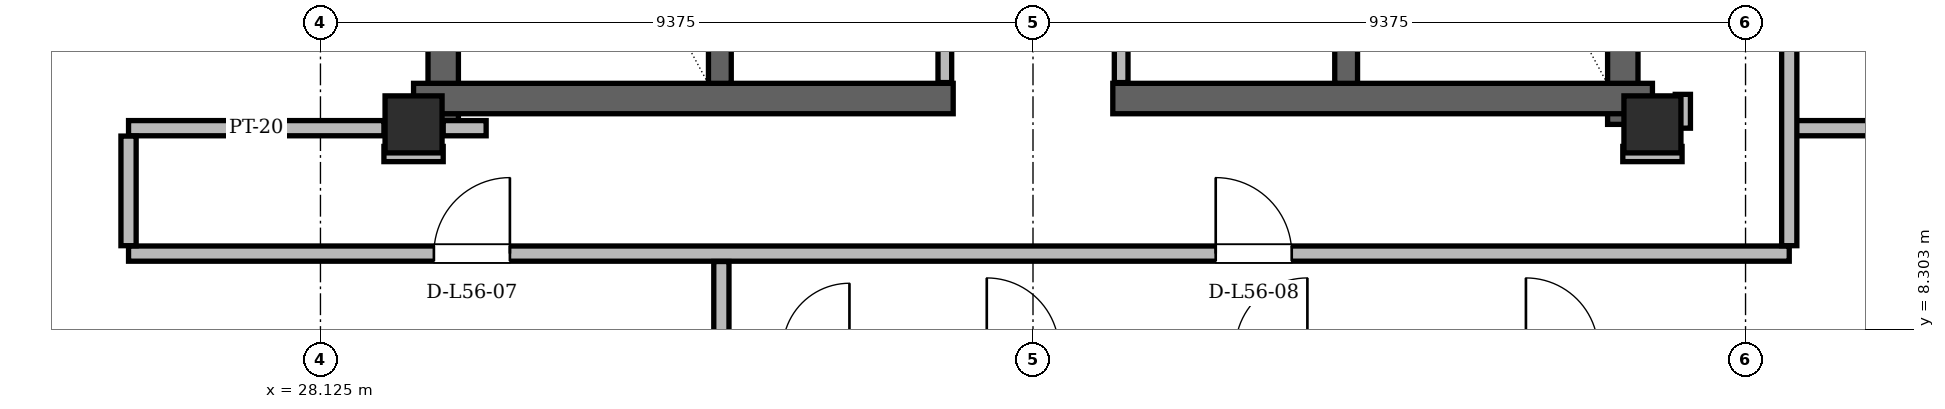
"""IFC4 building model, lengths in metres.
Left out: names, types, materials, properties, quantities, classifications, styles, units other than length and angle.
Written with IfcOpenShell. Run it as: python <this file> out.ifc"""

import sys

from ifc_helpers import new_model, si_unit, direction, frame, frame_2d, origin, origin_2d, place, context, subcontext, project, spatial, rectangle, hollow_rectangle, extrude, element, fill, save


model = new_model("IFC4")
c1 = context("Model", 3, precision=1e-05, world=origin(), true_north=direction((0.0, 1.0)))
c2 = subcontext(c1, "Body", "Model", "MODEL_VIEW")
j1 = project(units=[si_unit("LENGTHUNIT", "METRE"), si_unit("PLANEANGLEUNIT", "RADIAN")], contexts=[c1])
p1 = place(None, origin())
s1 = spatial("IfcSite", under=j1, at=p1, CompositionType="ELEMENT")
p2 = place(p1, origin())
s2 = spatial("IfcBuilding", under=s1, at=p2, CompositionType="ELEMENT")
p3 = place(p2, frame((0.0, 0.0, 212.7)))
s3 = spatial("IfcBuildingStorey", under=s2, at=p3, CompositionType="ELEMENT", Elevation=212.7)
for number, where, z_axis, x_axis in (
    (1, (29.35, 11.0, 0.0), (0.0, 0.0, 1.0), (1.0, 0.0, 0.0)),
    (2, (45.65, 11.0, 0.0), (0.0, 0.0, 1.0), (1.0, 0.0, 0.0)),
):
    element("IfcColumn", number, at=place(p3, frame(where, z_axis=z_axis, x_axis=x_axis)), inside=s3, PredefinedType="COLUMN", context=c2, shape_type="SweptSolid", body=[
        extrude(hollow_rectangle(XDim=0.75, YDim=0.75, WallThickness=0.06, at=origin_2d()), origin(), (0.0, 0.0, 1.0), 3.6),
    ])
for number, where, z_axis, x_axis in (
    (3, (29.74, 11.0, 0.0), (0.0, 0.0, 1.0), (0.0, 1.0, 0.0)),
    (4, (45.26, 11.0, 0.0), (0.0, 0.0, 1.0), (0.0, 1.0, 0.0)),
):
    element("IfcWall", number, at=place(p3, frame(where, z_axis=z_axis, x_axis=x_axis)), inside=s3, PredefinedType="SHEAR", context=c2, shape_type="SweptSolid", body=[
        extrude(rectangle(XDim=13.3, YDim=0.4, at=frame_2d((6.65, 0.0))), origin(), (0.0, 0.0, 1.0), 3.38),
    ])
for number, where, z_axis, x_axis in (
    (5, (29.35, 11.34, 0.0), (0.0, 0.0, 1.0), (1.0, 0.0, 0.0)),
    (6, (38.55, 11.34, 0.0), (0.0, 0.0, 1.0), (1.0, 0.0, 0.0)),
):
    element("IfcWall", number, at=place(p3, frame(where, z_axis=z_axis, x_axis=x_axis)), inside=s3, PredefinedType="SHEAR", context=c2, shape_type="SweptSolid", body=[
        extrude(rectangle(XDim=7.1, YDim=0.4, at=frame_2d((3.55, 0.0))), origin(), (0.0, 0.0, 1.0), 3.38),
    ])
for number, where, z_axis, x_axis in (
    (7, (33.38, 11.54, 0.0), (0.0, 0.0, 1.0), (0.0, 1.0, 0.0)),
    (8, (41.62, 11.54, 0.0), (0.0, 0.0, 1.0), (0.0, 1.0, 0.0)),
):
    element("IfcWall", number, at=place(p3, frame(where, z_axis=z_axis, x_axis=x_axis)), inside=s3, PredefinedType="SHEAR", context=c2, shape_type="SweptSolid", body=[
        extrude(rectangle(XDim=7.62, YDim=0.3, at=frame_2d((3.81, 0.0))), origin(), (0.0, 0.0, 1.0), 3.38),
    ])
p4 = place(p3, frame((59.201, 11.543, 0.0), z_axis=(0.0, 0.0, 1.0), x_axis=(-0.499999040053, 0.866025958009, 0.0)))
e9 = element("IfcWall", 9, at=p4, inside=s3, PredefinedType="SOLIDWALL", context=c2, shape_type="SweptSolid", body=[
    extrude(rectangle(XDim=36.523, YDim=0.29, at=frame_2d((18.261, 0.0))), origin(), (0.0, 0.0, 1.0), 2.677),
])
p5 = place(p4, frame((8.034, 0.0, 0.0)))
e10 = element("IfcOpeningElement", 10, at=p5, cuts=e9, PredefinedType="OPENING", context=c2, shape_type="SweptSolid", body=[
    extrude(rectangle(XDim=1.5, YDim=2.2, at=frame_2d((0.75, 1.1))), frame((0.0, 0.145, 0.0), z_axis=(0.0, -1.0, 0.0), x_axis=(1.0, 0.0, 0.0)), (0.0, 0.0, 1.0), 0.29),
])
p6 = place(p4, frame((31.594, 0.0, 0.0)))
e11 = element("IfcOpeningElement", 11, at=p6, cuts=e9, PredefinedType="OPENING", context=c2, shape_type="SweptSolid", body=[
    extrude(rectangle(XDim=1.5, YDim=2.2, at=frame_2d((0.75, 1.1))), frame((0.0, 0.145, 0.0), z_axis=(0.0, -1.0, 0.0), x_axis=(1.0, 0.0, 0.0)), (0.0, 0.0, 1.0), 0.29),
])
p7 = place(p4, frame((12.291, 0.0, 0.85)))
e12 = element("IfcOpeningElement", 12, at=p7, cuts=e9, PredefinedType="OPENING", context=c2, shape_type="SweptSolid", body=[
    extrude(rectangle(XDim=1.4, YDim=1.6, at=frame_2d((0.7, 0.8))), frame((0.0, 0.145, 0.0), z_axis=(0.0, -1.0, 0.0), x_axis=(1.0, 0.0, 0.0)), (0.0, 0.0, 1.0), 0.29),
])
p8 = place(p4, frame((2.252, 0.0, 0.85)))
e13 = element("IfcOpeningElement", 13, at=p8, cuts=e9, PredefinedType="OPENING", context=c2, shape_type="SweptSolid", body=[
    extrude(rectangle(XDim=1.2, YDim=1.48, at=frame_2d((0.6, 0.74))), frame((0.0, 0.145, 0.0), z_axis=(0.0, -1.0, 0.0), x_axis=(1.0, 0.0, 0.0)), (0.0, 0.0, 1.0), 0.29),
])
p9 = place(p4, frame((16.093, 0.0, 0.85)))
e14 = element("IfcOpeningElement", 14, at=p9, cuts=e9, PredefinedType="OPENING", context=c2, shape_type="SweptSolid", body=[
    extrude(rectangle(XDim=3.0, YDim=1.717, at=frame_2d((1.5, 0.858))), frame((0.0, 0.145, 0.0), z_axis=(0.0, -1.0, 0.0), x_axis=(1.0, 0.0, 0.0)), (0.0, 0.0, 1.0), 0.29),
])
p10 = place(p4, frame((23.458, 0.0, 0.85)))
e15 = element("IfcOpeningElement", 15, at=p10, cuts=e9, PredefinedType="OPENING", context=c2, shape_type="SweptSolid", body=[
    extrude(rectangle(XDim=1.2, YDim=1.48, at=frame_2d((0.6, 0.74))), frame((0.0, 0.145, 0.0), z_axis=(0.0, -1.0, 0.0), x_axis=(1.0, 0.0, 0.0)), (0.0, 0.0, 1.0), 0.29),
])
p11 = place(p4, frame((34.061, 0.0, 0.85)))
e16 = element("IfcOpeningElement", 16, at=p11, cuts=e9, PredefinedType="OPENING", context=c2, shape_type="SweptSolid", body=[
    extrude(rectangle(XDim=1.2, YDim=1.48, at=frame_2d((0.6, 0.74))), frame((0.0, 0.145, 0.0), z_axis=(0.0, -1.0, 0.0), x_axis=(1.0, 0.0, 0.0)), (0.0, 0.0, 1.0), 0.29),
])
p12 = place(p3, frame((34.06, 43.173, 0.0), z_axis=(0.0, 0.0, 1.0), x_axis=(-0.499999040053, -0.866025958009, 0.0)))
e17 = element("IfcWall", 17, at=p12, inside=s3, PredefinedType="SOLIDWALL", context=c2, shape_type="SweptSolid", body=[
    extrude(rectangle(XDim=36.523, YDim=0.29, at=frame_2d((18.261, 0.0))), origin(), (0.0, 0.0, 1.0), 2.677),
])
p13 = place(p12, frame((8.034, 0.0, 0.0)))
e18 = element("IfcOpeningElement", 18, at=p13, cuts=e17, PredefinedType="OPENING", context=c2, shape_type="SweptSolid", body=[
    extrude(rectangle(XDim=1.5, YDim=2.2, at=frame_2d((0.75, 1.1))), frame((0.0, 0.145, 0.0), z_axis=(0.0, -1.0, 0.0), x_axis=(1.0, 0.0, 0.0)), (0.0, 0.0, 1.0), 0.29),
])
p14 = place(p12, frame((28.233, 0.0, 0.0)))
e19 = element("IfcOpeningElement", 19, at=p14, cuts=e17, PredefinedType="OPENING", context=c2, shape_type="SweptSolid", body=[
    extrude(rectangle(XDim=1.5, YDim=2.2, at=frame_2d((0.75, 1.1))), frame((0.0, 0.145, 0.0), z_axis=(0.0, -1.0, 0.0), x_axis=(1.0, 0.0, 0.0)), (0.0, 0.0, 1.0), 0.29),
])
p15 = place(p12, frame((32.257, 0.0, 0.85)))
e20 = element("IfcOpeningElement", 20, at=p15, cuts=e17, PredefinedType="OPENING", context=c2, shape_type="SweptSolid", body=[
    extrude(rectangle(XDim=2.2, YDim=1.717, at=frame_2d((1.1, 0.858))), frame((0.0, 0.145, 0.0), z_axis=(0.0, -1.0, 0.0), x_axis=(1.0, 0.0, 0.0)), (0.0, 0.0, 1.0), 0.29),
])
p16 = place(p12, frame((22.716, 0.0, 0.85)))
e21 = element("IfcOpeningElement", 21, at=p16, cuts=e17, PredefinedType="OPENING", context=c2, shape_type="SweptSolid", body=[
    extrude(rectangle(XDim=1.2, YDim=1.48, at=frame_2d((0.6, 0.74))), frame((0.0, 0.145, 0.0), z_axis=(0.0, -1.0, 0.0), x_axis=(1.0, 0.0, 0.0)), (0.0, 0.0, 1.0), 0.29),
])
p17 = place(p12, frame((26.483, 0.0, 0.85)))
e22 = element("IfcOpeningElement", 22, at=p17, cuts=e17, PredefinedType="OPENING", context=c2, shape_type="SweptSolid", body=[
    extrude(rectangle(XDim=1.2, YDim=1.48, at=frame_2d((0.6, 0.74))), frame((0.0, 0.145, 0.0), z_axis=(0.0, -1.0, 0.0), x_axis=(1.0, 0.0, 0.0)), (0.0, 0.0, 1.0), 0.29),
])
p18 = place(p3, frame((36.34, 11.55, 0.0), z_axis=(0.0, 0.0, 1.0), x_axis=(0.0, 1.0, 0.0)))
e23 = element("IfcWall", 23, at=p18, inside=s3, PredefinedType="PARTITIONING", context=c2, shape_type="SweptSolid", body=[
    extrude(rectangle(XDim=5.55, YDim=0.18, at=frame_2d((2.775, 0.0))), origin(), (0.0, 0.0, 1.0), 3.38),
])
p19 = place(p18, frame((0.55, 0.0, 0.0)))
e24 = element("IfcOpeningElement", 24, at=p19, cuts=e23, PredefinedType="OPENING", context=c2, shape_type="SweptSolid", body=[
    extrude(rectangle(XDim=0.88, YDim=2.08, at=frame_2d((0.44, 1.04))), frame((0.0, 0.09, 0.0), z_axis=(0.0, -1.0, 0.0), x_axis=(1.0, 0.0, 0.0)), (0.0, 0.0, 1.0), 0.18),
])
p20 = place(p18, frame((3.25, 0.0, 0.0)))
e25 = element("IfcOpeningElement", 25, at=p20, cuts=e23, PredefinedType="OPENING", context=c2, shape_type="SweptSolid", body=[
    extrude(rectangle(XDim=0.88, YDim=2.08, at=frame_2d((0.44, 1.04))), frame((0.0, 0.09, 0.0), z_axis=(0.0, -1.0, 0.0), x_axis=(1.0, 0.0, 0.0)), (0.0, 0.0, 1.0), 0.18),
])
p21 = place(p3, frame((38.66, 11.55, 0.0), z_axis=(0.0, 0.0, 1.0), x_axis=(0.0, 1.0, 0.0)))
e26 = element("IfcWall", 26, at=p21, inside=s3, PredefinedType="PARTITIONING", context=c2, shape_type="SweptSolid", body=[
    extrude(rectangle(XDim=5.55, YDim=0.18, at=frame_2d((2.775, 0.0))), origin(), (0.0, 0.0, 1.0), 3.38),
])
p22 = place(p21, frame((1.35, 0.0, 0.0)))
e27 = element("IfcOpeningElement", 27, at=p22, cuts=e26, PredefinedType="OPENING", context=c2, shape_type="SweptSolid", body=[
    extrude(rectangle(XDim=0.88, YDim=2.08, at=frame_2d((0.44, 1.04))), frame((0.0, 0.09, 0.0), z_axis=(0.0, -1.0, 0.0), x_axis=(1.0, 0.0, 0.0)), (0.0, 0.0, 1.0), 0.18),
])
p23 = place(p21, frame((4.1, 0.0, 0.0)))
e28 = element("IfcOpeningElement", 28, at=p23, cuts=e26, PredefinedType="OPENING", context=c2, shape_type="SweptSolid", body=[
    extrude(rectangle(XDim=0.88, YDim=2.08, at=frame_2d((0.44, 1.04))), frame((0.0, 0.09, 0.0), z_axis=(0.0, -1.0, 0.0), x_axis=(1.0, 0.0, 0.0)), (0.0, 0.0, 1.0), 0.18),
])
p24 = place(p3, frame((25.6, 9.3, 0.0), z_axis=(0.0, 0.0, 1.0), x_axis=(1.0, 0.0, 0.0)))
e29 = element("IfcWall", 29, at=p24, inside=s3, PredefinedType="PARTITIONING", context=c2, shape_type="SweptSolid", body=[
    extrude(rectangle(XDim=21.85, YDim=0.2, at=frame_2d((10.925, 0.0))), origin(), (0.0, 0.0, 1.0), 2.913),
])
p25 = place(p24, frame((4.018, 0.0, 0.0)))
e30 = element("IfcOpeningElement", 30, at=p25, cuts=e29, PredefinedType="OPENING", context=c2, shape_type="SweptSolid", body=[
    extrude(rectangle(XDim=1.0, YDim=2.18, at=frame_2d((0.5, 1.09))), frame((0.0, 0.1, 0.0), z_axis=(0.0, -1.0, 0.0), x_axis=(1.0, 0.0, 0.0)), (0.0, 0.0, 1.0), 0.2),
])
p26 = place(p24, frame((14.304, 0.0, 0.0)))
e31 = element("IfcOpeningElement", 31, at=p26, cuts=e29, PredefinedType="OPENING", context=c2, shape_type="SweptSolid", body=[
    extrude(rectangle(XDim=1.0, YDim=2.18, at=frame_2d((0.5, 1.09))), frame((0.0, 0.1, 0.0), z_axis=(0.0, -1.0, 0.0), x_axis=(1.0, 0.0, 0.0)), (0.0, 0.0, 1.0), 0.2),
])
for number, where, z_axis, x_axis in (
    (32, (28.96, 10.61, 0.0), (0.0, 0.0, 1.0), (1.0, 0.0, 0.0)),
    (33, (45.26, 10.61, 0.0), (0.0, 0.0, 1.0), (1.0, 0.0, 0.0)),
):
    element("IfcWall", number, at=place(p3, frame(where, z_axis=z_axis, x_axis=x_axis)), inside=s3, PredefinedType="PARTITIONING", context=c2, shape_type="SweptSolid", body=[
        extrude(rectangle(XDim=0.78, YDim=0.2, at=frame_2d((0.39, 0.0))), origin(), (0.0, 0.0, 1.0), 3.38),
    ])
p27 = place(p3, frame((25.6, 10.95, 0.0), z_axis=(0.0, 0.0, 1.0), x_axis=(1.0, 0.0, 0.0)))
e34 = element("IfcWall", 34, at=p27, inside=s3, PredefinedType="PARTITIONING", context=c2, shape_type="SweptSolid", body=[
    extrude(rectangle(XDim=3.36, YDim=0.2, at=frame_2d((1.68, 0.0))), origin(), (0.0, 0.0, 1.0), 2.913),
])
p28 = place(p3, frame((29.74, 10.95, 0.0), z_axis=(0.0, 0.0, 1.0), x_axis=(1.0, 0.0, 0.0)))
e35 = element("IfcWall", 35, at=p28, inside=s3, PredefinedType="PARTITIONING", context=c2, shape_type="SweptSolid", body=[
    extrude(rectangle(XDim=0.565, YDim=0.2, at=frame_2d((0.282, 0.0))), origin(), (0.0, 0.0, 1.0), 2.52),
])
p29 = place(p3, frame((47.45, 10.95, 0.0), z_axis=(0.0, 0.0, 1.0), x_axis=(1.0, 0.0, 0.0)))
e36 = element("IfcWall", 36, at=p29, inside=s3, PredefinedType="PARTITIONING", context=c2, shape_type="SweptSolid", body=[
    extrude(rectangle(XDim=11.237, YDim=0.2, at=frame_2d((5.619, 0.0))), origin(), (0.0, 0.0, 1.0), 2.913),
])
p30 = place(p3, frame((25.6, 9.404, 0.0), z_axis=(0.0, 0.0, 1.0), x_axis=(0.0, 1.0, 0.0)))
e37 = element("IfcWall", 37, at=p30, inside=s3, PredefinedType="PARTITIONING", context=c2, shape_type="SweptSolid", body=[
    extrude(rectangle(XDim=1.442, YDim=0.2, at=frame_2d((0.721, 0.0))), origin(), (0.0, 0.0, 1.0), 3.38),
])
p31 = place(p3, frame((33.4, 5.734, 0.0), z_axis=(0.0, 0.0, 1.0), x_axis=(0.0, 1.0, 0.0)))
e38 = element("IfcWall", 38, at=p31, inside=s3, PredefinedType="PARTITIONING", context=c2, shape_type="SweptSolid", body=[
    extrude(rectangle(XDim=3.462, YDim=0.2, at=frame_2d((1.731, 0.0))), origin(), (0.0, 0.0, 1.0), 3.38),
])
p32 = place(p3, frame((46.05, 10.95, 0.0), z_axis=(0.0, 0.0, 1.0), x_axis=(0.0, 1.0, 0.0)))
e39 = element("IfcWall", 39, at=p32, inside=s3, PredefinedType="PARTITIONING", context=c2, shape_type="SweptSolid", body=[
    extrude(rectangle(XDim=0.445, YDim=0.2, at=frame_2d((0.223, 0.0))), origin(), (0.0, 0.0, 1.0), 2.913),
])
p33 = place(p3, frame((47.45, 9.404, 0.0), z_axis=(0.0, 0.0, 1.0), x_axis=(0.0, 1.0, 0.0)))
e40 = element("IfcWall", 40, at=p33, inside=s3, PredefinedType="PARTITIONING", context=c2, shape_type="SweptSolid", body=[
    extrude(rectangle(XDim=16.462, YDim=0.2, at=frame_2d((8.231, 0.0))), origin(), (0.0, 0.0, 1.0), 2.913),
])
p34 = place(p33, frame((9.496, 0.0, 0.0)))
e41 = element("IfcOpeningElement", 41, at=p34, cuts=e40, PredefinedType="OPENING", context=c2, shape_type="SweptSolid", body=[
    extrude(rectangle(XDim=1.0, YDim=2.18, at=frame_2d((0.5, 1.09))), frame((0.0, 0.1, 0.0), z_axis=(0.0, -1.0, 0.0), x_axis=(1.0, 0.0, 0.0)), (0.0, 0.0, 1.0), 0.2),
])
p35 = place(p25, origin())
e42 = element("IfcDoor", 42, at=p35, inside=s3, OperationType="SINGLE_SWING_RIGHT", PredefinedType="DOOR", context=c2, shape_type="SweptSolid", body=[
    extrude(rectangle(XDim=1.0, YDim=2.18, at=frame_2d((0.5, 1.09))), frame((0.0, 0.025, 0.0), z_axis=(0.0, -1.0, 0.0), x_axis=(1.0, 0.0, 0.0)), (0.0, 0.0, 1.0), 0.05),
])
fill(e30, e42)
p36 = place(p26, origin())
e43 = element("IfcDoor", 43, at=p36, inside=s3, OperationType="SINGLE_SWING_LEFT", PredefinedType="DOOR", context=c2, shape_type="SweptSolid", body=[
    extrude(rectangle(XDim=1.0, YDim=2.18, at=frame_2d((0.5, 1.09))), frame((0.0, 0.025, 0.0), z_axis=(0.0, -1.0, 0.0), x_axis=(1.0, 0.0, 0.0)), (0.0, 0.0, 1.0), 0.05),
])
fill(e31, e43)
save(model, sys.argv[1])
